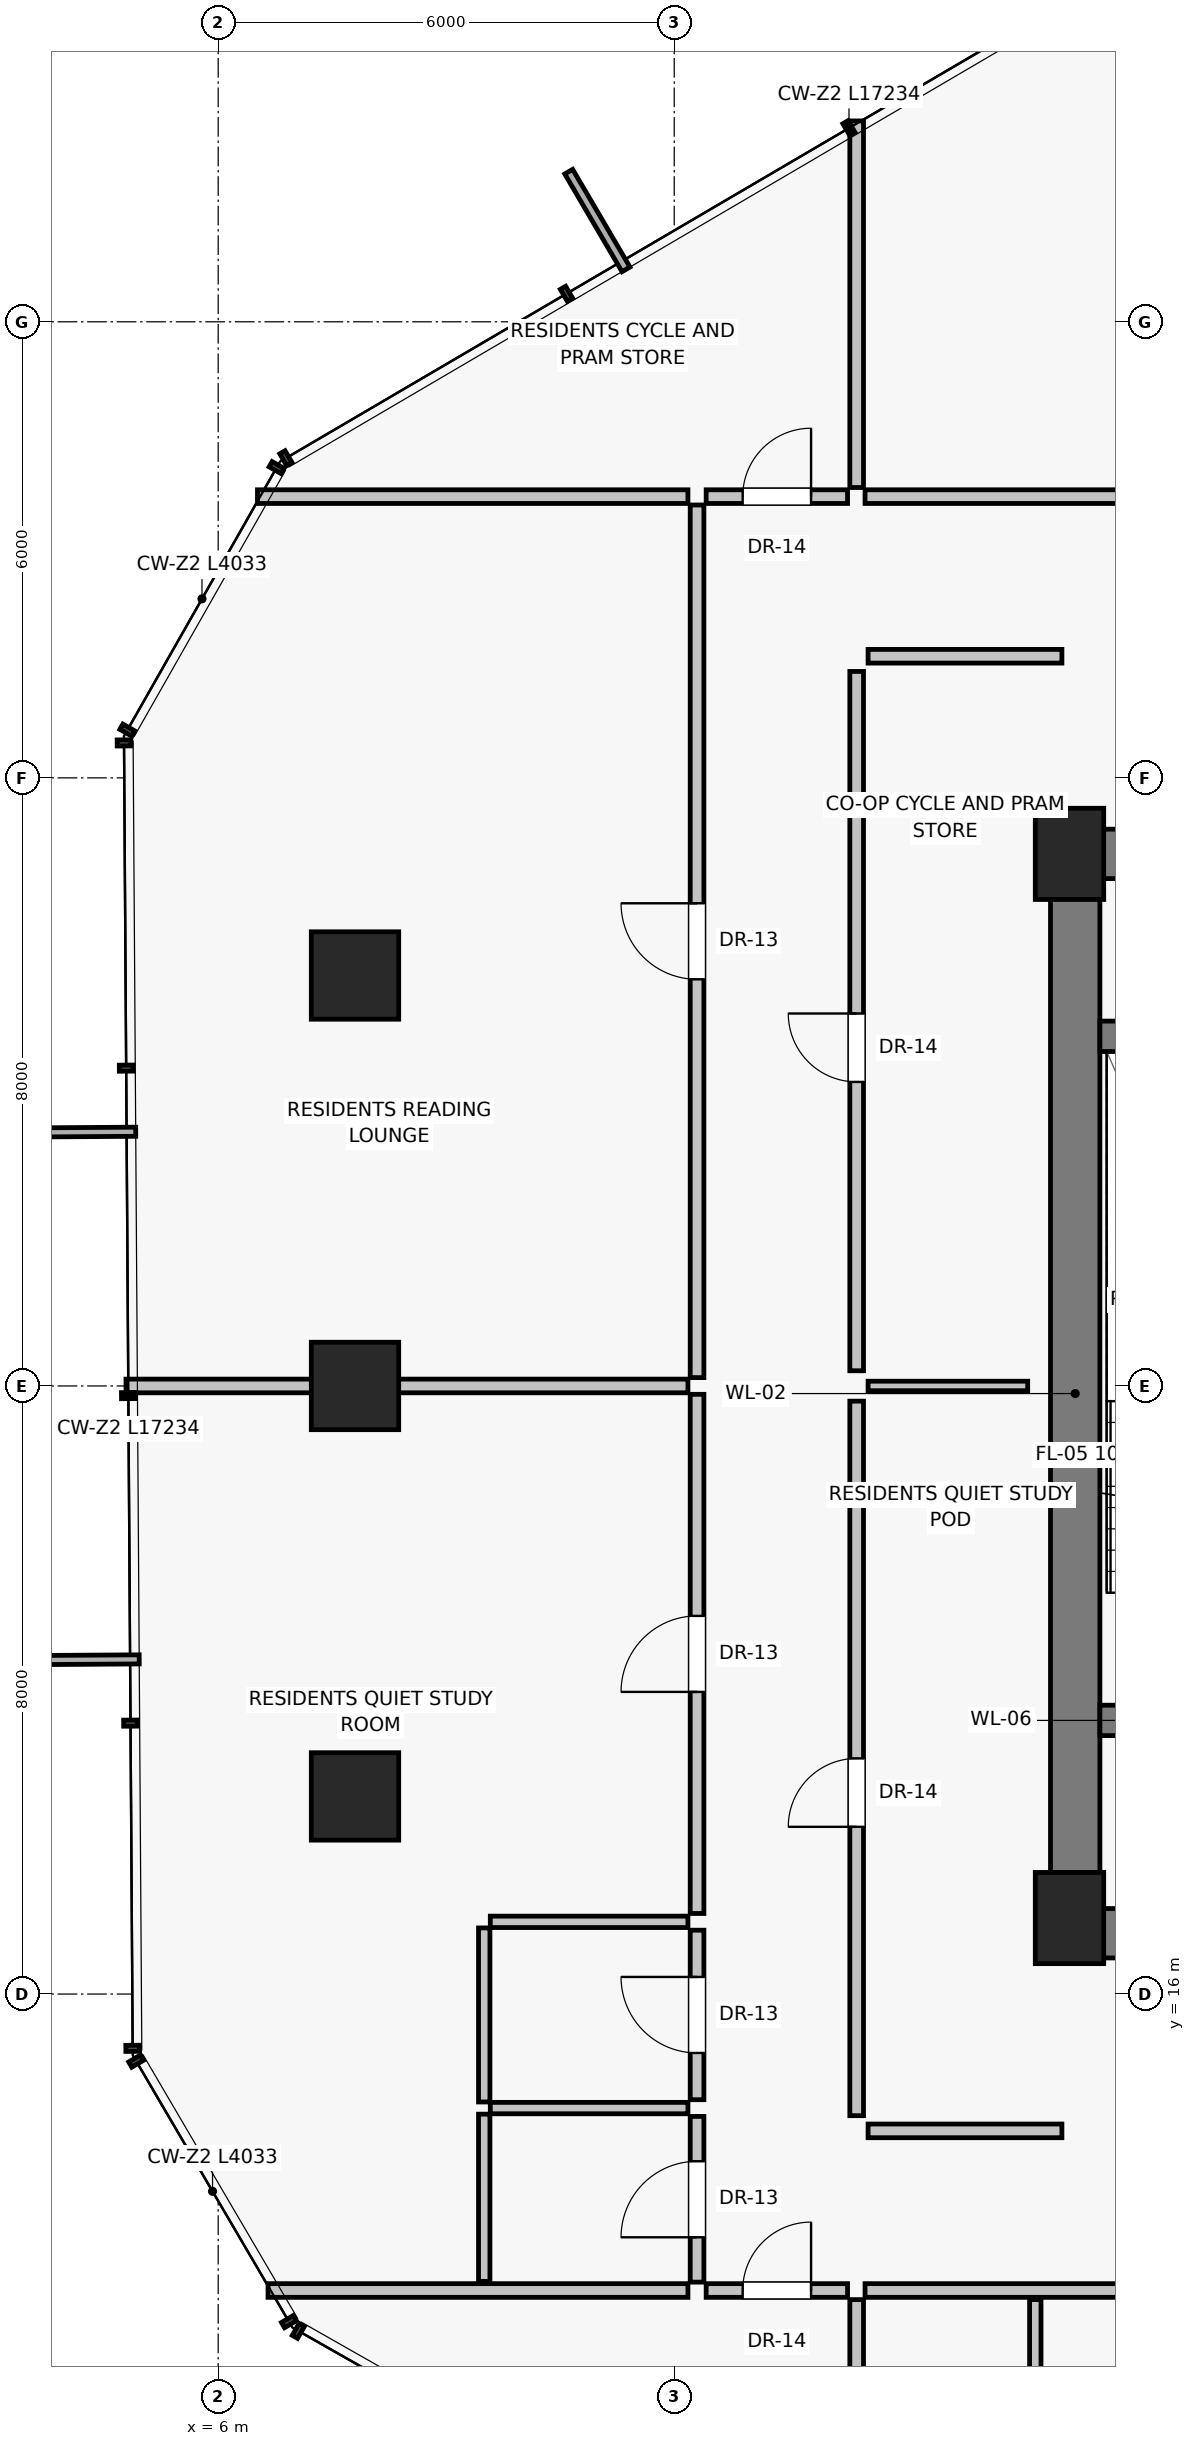
"""IFC4 building model, lengths in metres.
Left out: names, types, materials, properties, quantities, classifications, styles, units other than length and angle.
Written with IfcOpenShell. Run it as: python <this file> out.ifc"""

import sys

from ifc_helpers import new_model, si_unit, direction, frame, frame_2d, origin, origin_2d, place, context, subcontext, project, spatial, rectangle, extrude, source, transform, mapped, element, fill, save


model = new_model("IFC4")
c1 = context("Model", 3, precision=1e-05, world=origin(), true_north=direction((0.0, 1.0)))
c2 = subcontext(c1, "Body", "Model", "MODEL_VIEW")
j1 = project(units=[si_unit("LENGTHUNIT", "METRE"), si_unit("PLANEANGLEUNIT", "RADIAN")], contexts=[c1])
p1 = place(None, origin())
s1 = spatial("IfcSite", under=j1, at=p1, CompositionType="ELEMENT")
p2 = place(p1, origin())
s2 = spatial("IfcBuilding", under=s1, at=p2, CompositionType="ELEMENT")
p3 = place(p2, frame((0.0, 0.0, 129.5)))
s3 = spatial("IfcBuildingStorey", under=s2, at=p3, CompositionType="ELEMENT", Elevation=129.5)
for number, where, z_axis, x_axis in (
    (1, (17.2, 17.0, 0.0), (0.0, 0.0, 1.0), (1.0, 0.0, 0.0)),
    (2, (17.2, 31.0, 0.0), (0.0, 0.0, 1.0), (1.0, 0.0, 0.0)),
):
    element("IfcColumn", number, at=place(p3, frame(where, z_axis=z_axis, x_axis=x_axis)), inside=s3, PredefinedType="PILASTER", context=c2, shape_type="SweptSolid", body=[
        extrude(rectangle(XDim=0.9, YDim=1.2, at=origin_2d()), origin(), (0.0, 0.0, 1.0), 3.25),
    ])
for number, where, z_axis, x_axis in (
    (3, (7.8, 29.4, 0.0), (0.0, 0.0, 1.0), (1.0, 0.0, 0.0)),
    (4, (7.8, 24.0, 0.0), (0.0, 0.0, 1.0), (1.0, 0.0, 0.0)),
    (5, (7.8, 18.6, 0.0), (0.0, 0.0, 1.0), (1.0, 0.0, 0.0)),
):
    element("IfcColumn", number, at=place(p3, frame(where, z_axis=z_axis, x_axis=x_axis)), inside=s3, PredefinedType="COLUMN", context=c2, shape_type="SweptSolid", body=[
        extrude(rectangle(XDim=1.15, YDim=1.15, at=origin_2d()), origin(), (0.0, 0.0, 1.0), 3.25),
    ])
p4 = place(p3, frame((17.275, 16.8, 0.0), z_axis=(0.0, 0.0, 1.0), x_axis=(0.0, 1.0, 0.0)))
e6 = element("IfcWall", 6, at=p4, inside=s3, PredefinedType="SHEAR", context=c2, shape_type="SweptSolid", body=[
    extrude(rectangle(XDim=14.2, YDim=0.65, at=frame_2d((7.1, 0.0))), origin(), (0.0, 0.0, 1.0), 3.0),
])
p5 = place(p3, frame((17.2, 16.8, 0.0), z_axis=(0.0, 0.0, 1.0), x_axis=(1.0, 0.0, 0.0)))
e7 = element("IfcWall", 7, at=p5, inside=s3, PredefinedType="SHEAR", context=c2, shape_type="SweptSolid", body=[
    extrude(rectangle(XDim=5.85, YDim=0.65, at=frame_2d((2.925, 0.0))), origin(), (0.0, 0.0, 1.0), 3.0),
])
p6 = place(p5, frame((1.15, 0.0, 0.0)))
e8 = element("IfcOpeningElement", 8, at=p6, cuts=e7, PredefinedType="OPENING", context=c2, shape_type="SweptSolid", body=[
    extrude(rectangle(XDim=1.2, YDim=2.03, at=frame_2d((0.6, 1.015))), frame((0.0, 0.335, 0.0), z_axis=(0.0, -1.0, 0.0), x_axis=(1.0, 0.0, 0.0)), (0.0, 0.0, 1.0), 0.67),
])
p7 = place(p3, frame((17.2, 31.0, 0.0), z_axis=(0.0, 0.0, 1.0), x_axis=(1.0, 0.0, 0.0)))
e9 = element("IfcWall", 9, at=p7, inside=s3, PredefinedType="SHEAR", context=c2, shape_type="SweptSolid", body=[
    extrude(rectangle(XDim=3.8, YDim=0.65, at=frame_2d((1.9, 0.0))), origin(), (0.0, 0.0, 1.0), 3.0),
])
p8 = place(p7, frame((1.25, 0.0, 0.0)))
e10 = element("IfcOpeningElement", 10, at=p8, cuts=e9, PredefinedType="OPENING", context=c2, shape_type="SweptSolid", body=[
    extrude(rectangle(XDim=0.86, YDim=2.01, at=frame_2d((0.43, 1.005))), frame((0.0, 0.335, 0.0), z_axis=(0.0, -1.0, 0.0), x_axis=(1.0, 0.0, 0.0)), (0.0, 0.0, 1.0), 0.67),
])
p9 = place(p3, frame((17.6, 19.6, 0.0), z_axis=(0.0, 0.0, 1.0), x_axis=(1.0, 0.0, 0.0)))
e11 = element("IfcWall", 11, at=p9, inside=s3, PredefinedType="SHEAR", context=c2, shape_type="SweptSolid", body=[
    extrude(rectangle(XDim=3.4, YDim=0.4, at=frame_2d((1.7, 0.0))), origin(), (0.0, 0.0, 1.0), 3.0),
])
p10 = place(p9, frame((1.05, 0.0, 0.0)))
e12 = element("IfcOpeningElement", 12, at=p10, cuts=e11, PredefinedType="OPENING", context=c2, shape_type="SweptSolid", body=[
    extrude(rectangle(XDim=1.1, YDim=2.03, at=frame_2d((0.55, 1.015))), frame((0.0, 0.21, 0.0), z_axis=(0.0, -1.0, 0.0), x_axis=(1.0, 0.0, 0.0)), (0.0, 0.0, 1.0), 0.42),
])
p11 = place(p3, frame((17.6, 28.6, 0.0), z_axis=(0.0, 0.0, 1.0), x_axis=(1.0, 0.0, 0.0)))
e13 = element("IfcWall", 13, at=p11, inside=s3, PredefinedType="SHEAR", context=c2, shape_type="SweptSolid", body=[
    extrude(rectangle(XDim=3.4, YDim=0.4, at=frame_2d((1.7, 0.0))), origin(), (0.0, 0.0, 1.0), 3.0),
])
p12 = place(p3, frame((14.4, 14.4, 0.0), z_axis=(0.0, 0.0, 1.0), x_axis=(0.0, 1.0, 0.0)))
e14 = element("IfcWall", 14, at=p12, inside=s3, PredefinedType="PARTITIONING", context=c2, shape_type="SweptSolid", body=[
    extrude(rectangle(XDim=9.4, YDim=0.18, at=frame_2d((4.7, 0.0))), origin(), (0.0, 0.0, 1.0), 3.0),
])
p13 = place(p12, frame((3.8, 0.0, 0.0)))
e15 = element("IfcOpeningElement", 15, at=p13, cuts=e14, PredefinedType="OPENING", context=c2, shape_type="SweptSolid", body=[
    extrude(rectangle(XDim=0.9, YDim=2.01, at=frame_2d((0.45, 1.005))), frame((0.0, 0.1, 0.0), z_axis=(0.0, -1.0, 0.0), x_axis=(1.0, 0.0, 0.0)), (0.0, 0.0, 1.0), 0.2),
])
p14 = place(p3, frame((14.4, 24.2, 0.0), z_axis=(0.0, 0.0, 1.0), x_axis=(0.0, 1.0, 0.0)))
e16 = element("IfcWall", 16, at=p14, inside=s3, PredefinedType="PARTITIONING", context=c2, shape_type="SweptSolid", body=[
    extrude(rectangle(XDim=9.2, YDim=0.18, at=frame_2d((4.6, 0.0))), origin(), (0.0, 0.0, 1.0), 3.0),
])
p15 = place(p14, frame((3.8, 0.0, 0.0)))
e17 = element("IfcOpeningElement", 17, at=p15, cuts=e16, PredefinedType="OPENING", context=c2, shape_type="SweptSolid", body=[
    extrude(rectangle(XDim=0.9, YDim=2.01, at=frame_2d((0.45, 1.005))), frame((0.0, 0.1, 0.0), z_axis=(0.0, -1.0, 0.0), x_axis=(1.0, 0.0, 0.0)), (0.0, 0.0, 1.0), 0.2),
])
p16 = place(p3, frame((14.55, 24.0, 0.0), z_axis=(0.0, 0.0, 1.0), x_axis=(1.0, 0.0, 0.0)))
e18 = element("IfcWall", 18, at=p16, inside=s3, PredefinedType="PARTITIONING", context=c2, shape_type="SweptSolid", body=[
    extrude(rectangle(XDim=2.1, YDim=0.125, at=frame_2d((1.05, 0.0))), origin(), (0.0, 0.0, 1.0), 3.0),
])
for number, where, z_axis, x_axis in (
    (19, (14.55, 14.2, 0.0), (0.0, 0.0, 1.0), (1.0, 0.0, 0.0)),
    (20, (14.55, 33.6, 0.0), (0.0, 0.0, 1.0), (1.0, 0.0, 0.0)),
):
    element("IfcWall", number, at=place(p3, frame(where, z_axis=z_axis, x_axis=x_axis)), inside=s3, PredefinedType="PARTITIONING", context=c2, shape_type="SweptSolid", body=[
        extrude(rectangle(XDim=2.55, YDim=0.18, at=frame_2d((1.275, 0.0))), origin(), (0.0, 0.0, 1.0), 3.0),
    ])
p17 = place(p3, frame((14.4, 11.98, 0.0), z_axis=(0.0, 0.0, 1.0), x_axis=(0.0, -1.0, 0.0)))
e21 = element("IfcWall", 21, at=p17, inside=s3, PredefinedType="PARTITIONING", context=c2, shape_type="SweptSolid", body=[
    extrude(rectangle(XDim=4.623, YDim=0.18, at=frame_2d((2.311, 0.0))), origin(), (0.0, 0.0, 1.0), 3.0),
])
p18 = place(p3, frame((14.51, 12.1, 0.0), z_axis=(0.0, 0.0, 1.0), x_axis=(1.0, 0.0, 0.0)))
e22 = element("IfcWall", 22, at=p18, inside=s3, PredefinedType="PARTITIONING", context=c2, shape_type="SweptSolid", body=[
    extrude(rectangle(XDim=5.876, YDim=0.18, at=frame_2d((2.938, 0.0))), origin(), (0.0, 0.0, 1.0), 2.58),
])
p19 = place(p18, frame((3.549, 0.0, 0.0)))
e23 = element("IfcOpeningElement", 23, at=p19, cuts=e22, PredefinedType="OPENING", context=c2, shape_type="SweptSolid", body=[
    extrude(rectangle(XDim=0.95, YDim=2.02, at=frame_2d((0.475, 1.01))), frame((0.0, 0.1, 0.0), z_axis=(0.0, -1.0, 0.0), x_axis=(1.0, 0.0, 0.0)), (0.0, 0.0, 1.0), 0.2),
])
p20 = place(p3, frame((16.75, 11.98, 0.0), z_axis=(0.0, 0.0, 1.0), x_axis=(0.0, -1.0, 0.0)))
e24 = element("IfcWall", 24, at=p20, inside=s3, PredefinedType="PARTITIONING", context=c2, shape_type="SweptSolid", body=[
    extrude(rectangle(XDim=2.05, YDim=0.15, at=frame_2d((1.025, 0.0))), origin(), (0.0, 0.0, 1.0), 3.0),
])
p21 = place(p3, frame((14.4, 35.82, 0.0), z_axis=(0.0, 0.0, 1.0), x_axis=(0.0, 1.0, 0.0)))
e25 = element("IfcWall", 25, at=p21, inside=s3, PredefinedType="PARTITIONING", context=c2, shape_type="SweptSolid", body=[
    extrude(rectangle(XDim=4.823, YDim=0.18, at=frame_2d((2.411, 0.0))), origin(), (0.0, 0.0, 1.0), 3.0),
])
p22 = place(p3, frame((14.51, 35.7, 0.0), z_axis=(0.0, 0.0, 1.0), x_axis=(1.0, 0.0, 0.0)))
e26 = element("IfcWall", 26, at=p22, inside=s3, PredefinedType="PARTITIONING", context=c2, shape_type="SweptSolid", body=[
    extrude(rectangle(XDim=9.924, YDim=0.18, at=frame_2d((4.962, 0.0))), origin(), (0.0, 0.0, 1.0), 2.58),
])
p23 = place(p22, frame((4.062, 0.0, 0.0)))
e27 = element("IfcOpeningElement", 27, at=p23, cuts=e26, PredefinedType="OPENING", context=c2, shape_type="SweptSolid", body=[
    extrude(rectangle(XDim=1.8, YDim=2.25, at=frame_2d((0.9, 1.125))), frame((0.0, 0.1, 0.0), z_axis=(0.0, -1.0, 0.0), x_axis=(1.0, 0.0, 0.0)), (0.0, 0.0, 1.0), 0.2),
])
p24 = place(p3, frame((12.18, 12.1, 0.0), z_axis=(0.0, 0.0, 1.0), x_axis=(-1.0, 0.0, 0.0)))
e28 = element("IfcWall", 28, at=p24, inside=s3, PredefinedType="PARTITIONING", context=c2, shape_type="SweptSolid", body=[
    extrude(rectangle(XDim=5.524, YDim=0.18, at=frame_2d((2.762, 0.0))), origin(), (0.0, 0.0, 1.0), 3.0),
])
p25 = place(p3, frame((12.18, 35.7, 0.0), z_axis=(0.0, 0.0, 1.0), x_axis=(-1.0, 0.0, 0.0)))
e29 = element("IfcWall", 29, at=p25, inside=s3, PredefinedType="PARTITIONING", context=c2, shape_type="SweptSolid", body=[
    extrude(rectangle(XDim=5.663, YDim=0.18, at=frame_2d((2.832, 0.0))), origin(), (0.0, 0.0, 1.0), 3.0),
])
p26 = place(p3, frame((12.3, 12.21, 0.0), z_axis=(0.0, 0.0, 1.0), x_axis=(0.0, 1.0, 0.0)))
e30 = element("IfcWall", 30, at=p26, inside=s3, PredefinedType="PARTITIONING", context=c2, shape_type="SweptSolid", body=[
    extrude(rectangle(XDim=2.18, YDim=0.18, at=frame_2d((1.09, 0.0))), origin(), (0.0, 0.0, 1.0), 3.0),
])
p27 = place(p26, frame((0.59, 0.0, 0.0)))
e31 = element("IfcOpeningElement", 31, at=p27, cuts=e30, PredefinedType="OPENING", context=c2, shape_type="SweptSolid", body=[
    extrude(rectangle(XDim=1.0, YDim=2.01, at=frame_2d((0.5, 1.005))), frame((0.0, 0.1, 0.0), z_axis=(0.0, -1.0, 0.0), x_axis=(1.0, 0.0, 0.0)), (0.0, 0.0, 1.0), 0.2),
])
p28 = place(p3, frame((12.3, 14.61, 0.0), z_axis=(0.0, 0.0, 1.0), x_axis=(0.0, 1.0, 0.0)))
e32 = element("IfcWall", 32, at=p28, inside=s3, PredefinedType="PARTITIONING", context=c2, shape_type="SweptSolid", body=[
    extrude(rectangle(XDim=2.23, YDim=0.18, at=frame_2d((1.115, 0.0))), origin(), (0.0, 0.0, 1.0), 3.0),
])
p29 = place(p28, frame((0.615, 0.0, 0.0)))
e33 = element("IfcOpeningElement", 33, at=p29, cuts=e32, PredefinedType="OPENING", context=c2, shape_type="SweptSolid", body=[
    extrude(rectangle(XDim=1.0, YDim=2.01, at=frame_2d((0.5, 1.005))), frame((0.0, 0.1, 0.0), z_axis=(0.0, -1.0, 0.0), x_axis=(1.0, 0.0, 0.0)), (0.0, 0.0, 1.0), 0.2),
])
p30 = place(p3, frame((12.3, 17.06, 0.0), z_axis=(0.0, 0.0, 1.0), x_axis=(0.0, 1.0, 0.0)))
e34 = element("IfcWall", 34, at=p30, inside=s3, PredefinedType="PARTITIONING", context=c2, shape_type="SweptSolid", body=[
    extrude(rectangle(XDim=6.83, YDim=0.18, at=frame_2d((3.415, 0.0))), origin(), (0.0, 0.0, 1.0), 2.58),
])
p31 = place(p30, frame((2.915, 0.0, 0.0)))
e35 = element("IfcOpeningElement", 35, at=p31, cuts=e34, PredefinedType="OPENING", context=c2, shape_type="SweptSolid", body=[
    extrude(rectangle(XDim=1.0, YDim=2.01, at=frame_2d((0.5, 1.005))), frame((0.0, 0.1, 0.0), z_axis=(0.0, -1.0, 0.0), x_axis=(1.0, 0.0, 0.0)), (0.0, 0.0, 1.0), 0.2),
])
p32 = place(p3, frame((12.3, 24.11, 0.0), z_axis=(0.0, 0.0, 1.0), x_axis=(0.0, 1.0, 0.0)))
e36 = element("IfcWall", 36, at=p32, inside=s3, PredefinedType="PARTITIONING", context=c2, shape_type="SweptSolid", body=[
    extrude(rectangle(XDim=11.48, YDim=0.18, at=frame_2d((5.74, 0.0))), origin(), (0.0, 0.0, 1.0), 2.58),
])
p33 = place(p32, frame((5.24, 0.0, 0.0)))
e37 = element("IfcOpeningElement", 37, at=p33, cuts=e36, PredefinedType="OPENING", context=c2, shape_type="SweptSolid", body=[
    extrude(rectangle(XDim=1.0, YDim=2.01, at=frame_2d((0.5, 1.005))), frame((0.0, 0.1, 0.0), z_axis=(0.0, -1.0, 0.0), x_axis=(1.0, 0.0, 0.0)), (0.0, 0.0, 1.0), 0.2),
])
for number, where, z_axis, x_axis in (
    (38, (12.18, 14.5, 0.0), (0.0, 0.0, 1.0), (-1.0, 0.0, 0.0)),
    (39, (12.18, 16.95, 0.0), (0.0, 0.0, 1.0), (-1.0, 0.0, 0.0)),
):
    element("IfcWall", number, at=place(p3, frame(where, z_axis=z_axis, x_axis=x_axis)), inside=s3, PredefinedType="PARTITIONING", context=c2, shape_type="SweptSolid", body=[
        extrude(rectangle(XDim=2.6, YDim=0.15, at=frame_2d((1.3, 0.0))), origin(), (0.0, 0.0, 1.0), 3.0),
    ])
p34 = place(p3, frame((9.5, 12.22, 0.0), z_axis=(0.0, 0.0, 1.0), x_axis=(0.0, 1.0, 0.0)))
e40 = element("IfcWall", 40, at=p34, inside=s3, PredefinedType="PARTITIONING", context=c2, shape_type="SweptSolid", body=[
    extrude(rectangle(XDim=2.2, YDim=0.15, at=frame_2d((1.1, 0.0))), origin(), (0.0, 0.0, 1.0), 3.0),
])
p35 = place(p3, frame((9.5, 14.58, 0.0), z_axis=(0.0, 0.0, 1.0), x_axis=(0.0, 1.0, 0.0)))
e41 = element("IfcWall", 41, at=p35, inside=s3, PredefinedType="PARTITIONING", context=c2, shape_type="SweptSolid", body=[
    extrude(rectangle(XDim=2.29, YDim=0.15, at=frame_2d((1.145, 0.0))), origin(), (0.0, 0.0, 1.0), 3.0),
])
p36 = place(p3, frame((12.18, 24.0, 0.0), z_axis=(0.0, 0.0, 1.0), x_axis=(-1.0, 0.0, 0.0)))
e42 = element("IfcWall", 42, at=p36, inside=s3, PredefinedType="PARTITIONING", context=c2, shape_type="SweptSolid", body=[
    extrude(rectangle(XDim=7.393, YDim=0.18, at=frame_2d((3.696, 0.0))), origin(), (0.0, 0.0, 1.0), 3.0),
])
p37 = place(p3, frame((12.42, 12.1, 0.0), z_axis=(0.0, 0.0, 1.0), x_axis=(1.0, 0.0, 0.0)))
e43 = element("IfcWall", 43, at=p37, inside=s3, PredefinedType="PARTITIONING", context=c2, shape_type="SweptSolid", body=[
    extrude(rectangle(XDim=1.86, YDim=0.18, at=frame_2d((0.93, 0.0))), origin(), (0.0, 0.0, 1.0), 3.0),
])
p38 = place(p37, frame((0.48, 0.0, 0.0)))
e44 = element("IfcOpeningElement", 44, at=p38, cuts=e43, PredefinedType="OPENING", context=c2, shape_type="SweptSolid", body=[
    extrude(rectangle(XDim=0.9, YDim=2.01, at=frame_2d((0.45, 1.005))), frame((0.0, 0.1, 0.0), z_axis=(0.0, -1.0, 0.0), x_axis=(1.0, 0.0, 0.0)), (0.0, 0.0, 1.0), 0.2),
])
p39 = place(p3, frame((12.42, 35.7, 0.0), z_axis=(0.0, 0.0, 1.0), x_axis=(1.0, 0.0, 0.0)))
e45 = element("IfcWall", 45, at=p39, inside=s3, PredefinedType="PARTITIONING", context=c2, shape_type="SweptSolid", body=[
    extrude(rectangle(XDim=1.86, YDim=0.18, at=frame_2d((0.93, 0.0))), origin(), (0.0, 0.0, 1.0), 3.0),
])
p40 = place(p39, frame((0.48, 0.0, 0.0)))
e46 = element("IfcOpeningElement", 46, at=p40, cuts=e45, PredefinedType="OPENING", context=c2, shape_type="SweptSolid", body=[
    extrude(rectangle(XDim=0.9, YDim=2.01, at=frame_2d((0.45, 1.005))), frame((0.0, 0.1, 0.0), z_axis=(0.0, -1.0, 0.0), x_axis=(1.0, 0.0, 0.0)), (0.0, 0.0, 1.0), 0.2),
])
m1 = source(origin(), c2, "Body", "SweptSolid", [
    extrude(rectangle(XDim=0.9, YDim=2.01, at=frame_2d((0.45, 1.005))), frame((0.0, 0.025, 0.0), z_axis=(0.0, -1.0, 0.0), x_axis=(1.0, 0.0, 0.0)), (0.0, 0.0, 1.0), 0.05),
])
p41 = place(p13, origin())
e47 = element("IfcDoor", 47, at=p41, inside=s3, OperationType="SINGLE_SWING_LEFT", PredefinedType="DOOR", context=c2, shape_type="MappedRepresentation", body=[
    mapped(m1, transform((0.0, 0.0, 0.0), scale=1.0)),
])
fill(e15, e47)
p42 = place(p15, origin())
e48 = element("IfcDoor", 48, at=p42, inside=s3, OperationType="SINGLE_SWING_RIGHT", PredefinedType="DOOR", context=c2, shape_type="MappedRepresentation", body=[
    mapped(m1, transform((0.0, 0.0, 0.0), scale=1.0)),
])
fill(e17, e48)
m2 = source(origin(), c2, "Body", "SweptSolid", [
    extrude(rectangle(XDim=1.0, YDim=2.01, at=frame_2d((0.5, 1.005))), frame((0.0, 0.025, 0.0), z_axis=(0.0, -1.0, 0.0), x_axis=(1.0, 0.0, 0.0)), (0.0, 0.0, 1.0), 0.05),
])
p43 = place(p27, origin())
e49 = element("IfcDoor", 49, at=p43, inside=s3, OperationType="SINGLE_SWING_LEFT", PredefinedType="DOOR", context=c2, shape_type="MappedRepresentation", body=[
    mapped(m2, transform((0.0, 0.0, 0.0), scale=1.0)),
])
fill(e31, e49)
p44 = place(p29, origin())
e50 = element("IfcDoor", 50, at=p44, inside=s3, OperationType="SINGLE_SWING_RIGHT", PredefinedType="DOOR", context=c2, shape_type="MappedRepresentation", body=[
    mapped(m2, transform((0.0, 0.0, 0.0), scale=1.0)),
])
fill(e33, e50)
p45 = place(p31, origin())
e51 = element("IfcDoor", 51, at=p45, inside=s3, OperationType="SINGLE_SWING_LEFT", PredefinedType="DOOR", context=c2, shape_type="MappedRepresentation", body=[
    mapped(m2, transform((0.0, 0.0, 0.0), scale=1.0)),
])
fill(e35, e51)
p46 = place(p33, origin())
e52 = element("IfcDoor", 52, at=p46, inside=s3, OperationType="SINGLE_SWING_RIGHT", PredefinedType="DOOR", context=c2, shape_type="MappedRepresentation", body=[
    mapped(m2, transform((0.0, 0.0, 0.0), scale=1.0)),
])
fill(e37, e52)
p47 = place(p38, origin())
e53 = element("IfcDoor", 53, at=p47, inside=s3, OperationType="SINGLE_SWING_RIGHT", PredefinedType="DOOR", context=c2, shape_type="MappedRepresentation", body=[
    mapped(m1, transform((0.0, 0.0, 0.0), scale=1.0)),
])
fill(e44, e53)
p48 = place(p40, origin())
e54 = element("IfcDoor", 54, at=p48, inside=s3, OperationType="SINGLE_SWING_RIGHT", PredefinedType="DOOR", context=c2, shape_type="MappedRepresentation", body=[
    mapped(m1, transform((0.0, 0.0, 0.0), scale=1.0)),
])
fill(e46, e54)
save(model, sys.argv[1])
